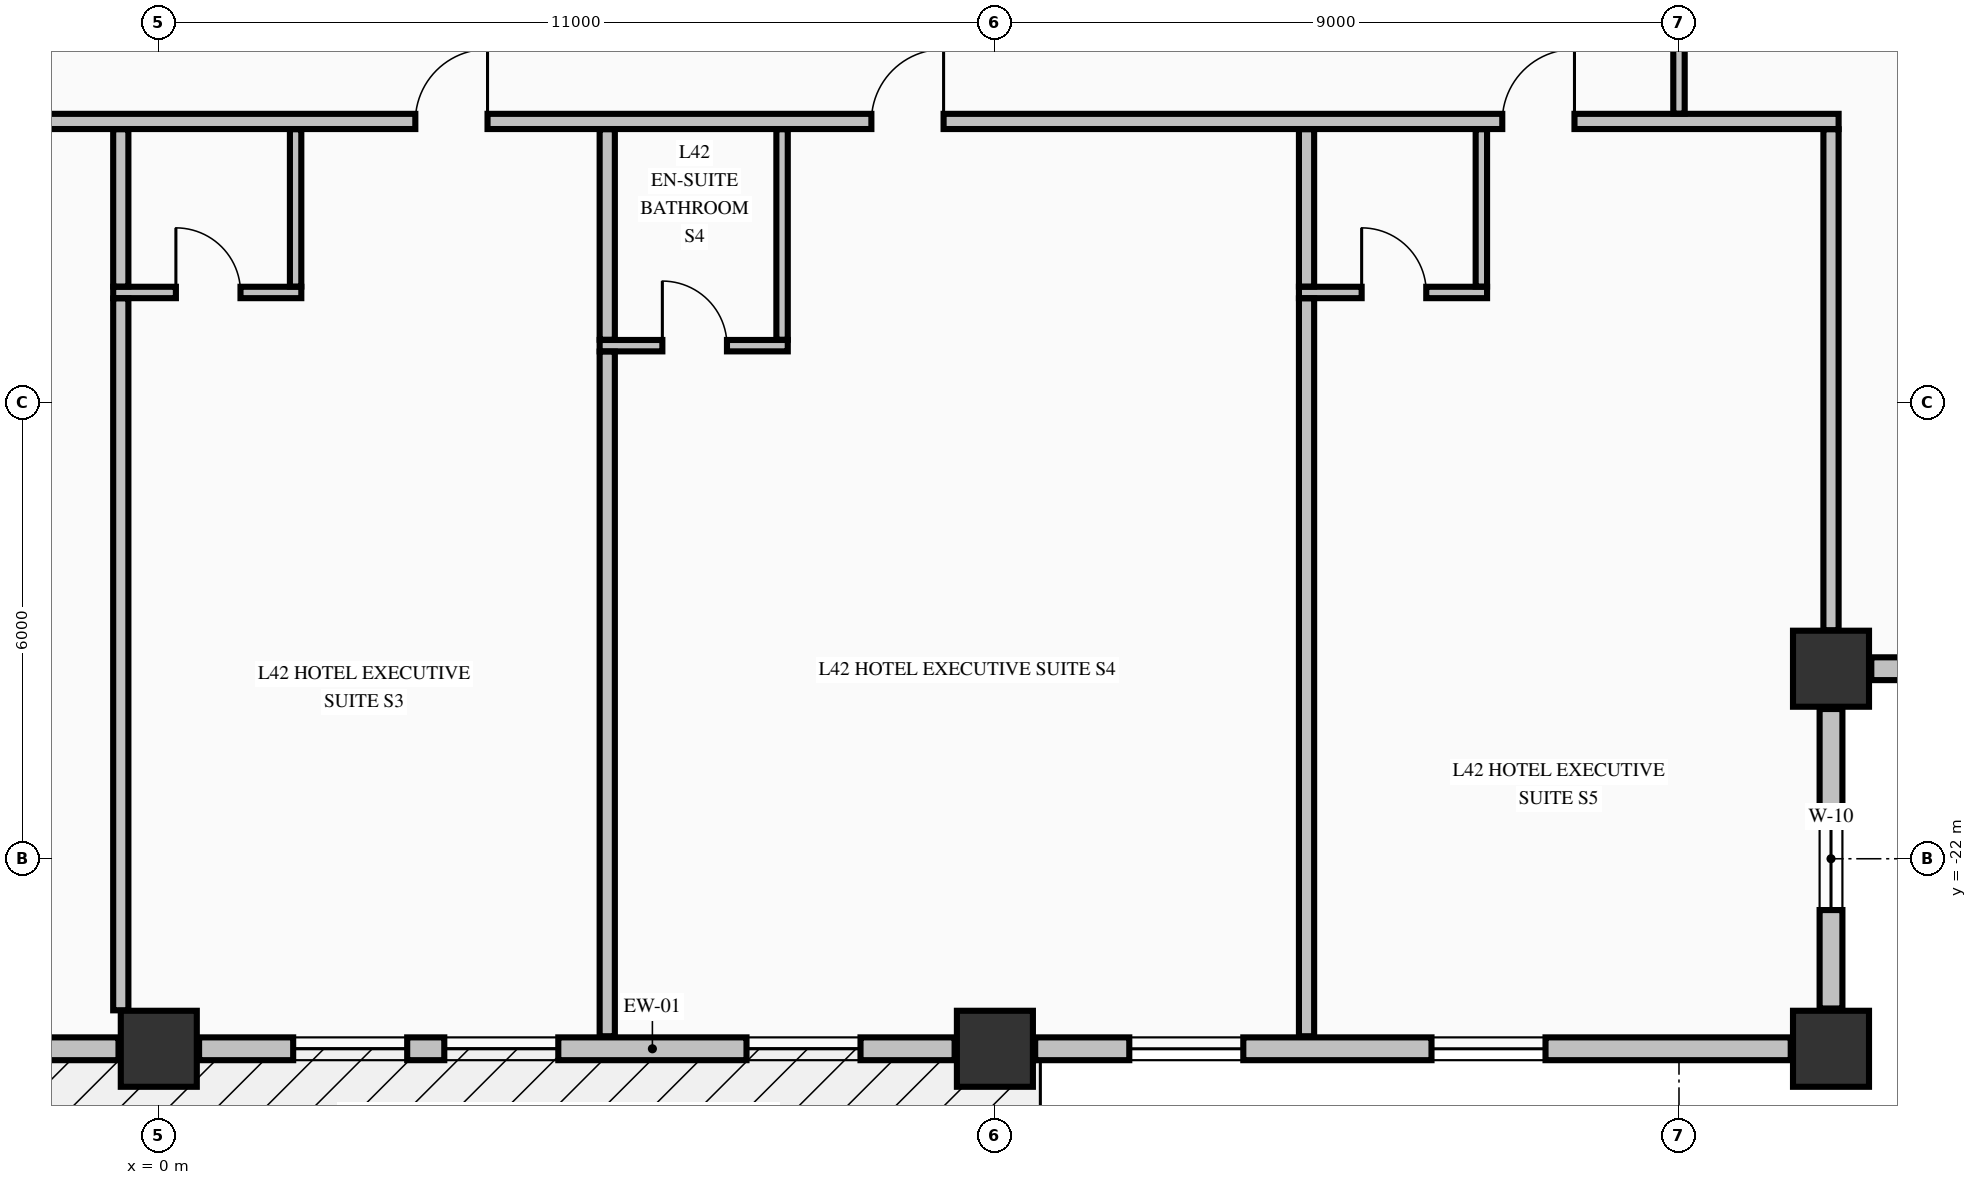
"""IFC4 building model, lengths in metres.
Left out: names, types, materials, properties, quantities, classifications, styles, units other than length and angle.
Written with IfcOpenShell. Run it as: python <this file> out.ifc"""

import sys

from ifc_helpers import new_model, si_unit, direction, frame, frame_2d, origin, origin_2d, place, context, subcontext, project, spatial, rectangle, extrude, element, fill, save


model = new_model("IFC4")
c1 = context("Model", 3, precision=1e-05, world=origin(), true_north=direction((0.0, 1.0)))
c2 = subcontext(c1, "Body", "Model", "MODEL_VIEW")
j1 = project(units=[si_unit("LENGTHUNIT", "METRE"), si_unit("PLANEANGLEUNIT", "RADIAN")], contexts=[c1])
p1 = place(None, origin())
s1 = spatial("IfcSite", under=j1, at=p1, CompositionType="ELEMENT")
p2 = place(p1, origin())
s2 = spatial("IfcBuilding", under=s1, at=p2, CompositionType="ELEMENT")
p3 = place(p2, frame((0.0, 0.0, 166.06)))
s3 = spatial("IfcBuildingStorey", under=s2, at=p3, CompositionType="ELEMENT", Elevation=166.06)
for number, where, z_axis, x_axis in (
    (1, (0.0, -24.5, -0.25), (0.0, 0.0, 1.0), (1.0, 0.0, 0.0)),
    (2, (11.0, -24.5, -0.25), (0.0, 0.0, 1.0), (1.0, 0.0, 0.0)),
    (3, (22.0, -24.5, -0.25), (0.0, 0.0, 1.0), (1.0, 0.0, 0.0)),
    (4, (22.0, -19.5, -0.25), (0.0, 0.0, 1.0), (1.0, 0.0, 0.0)),
):
    element("IfcColumn", number, at=place(p3, frame(where, z_axis=z_axis, x_axis=x_axis)), inside=s3, PredefinedType="COLUMN", context=c2, shape_type="SweptSolid", body=[
        extrude(rectangle(XDim=1.0, YDim=1.0, at=origin_2d()), origin(), (0.0, 0.0, 1.0), 3.4),
    ])
p4 = place(p3, frame((22.0, -23.97, 0.0), z_axis=(0.0, 0.0, 1.0), x_axis=(0.0, 1.0, 0.0)))
e5 = element("IfcWall", 5, at=p4, inside=s3, PredefinedType="STANDARD", context=c2, shape_type="SweptSolid", body=[
    extrude(rectangle(XDim=3.94, YDim=0.3, at=frame_2d((1.97, 0.0))), origin(), (0.0, 0.0, 1.0), 2.542),
])
p5 = place(p4, frame((1.295, 0.0, 0.68)))
e6 = element("IfcOpeningElement", 6, at=p5, cuts=e5, PredefinedType="OPENING", context=c2, shape_type="SweptSolid", body=[
    extrude(rectangle(XDim=1.35, YDim=1.42, at=frame_2d((0.675, 0.71))), frame((0.0, 0.16, 0.0), z_axis=(0.0, -1.0, 0.0), x_axis=(1.0, 0.0, 0.0)), (0.0, 0.0, 1.0), 0.32),
])
p6 = place(p3, frame((22.53, -19.5, 0.0), z_axis=(0.0, 0.0, 1.0), x_axis=(1.0, 0.0, 0.0)))
e7 = element("IfcWall", 7, at=p6, inside=s3, PredefinedType="STANDARD", context=c2, shape_type="SweptSolid", body=[
    extrude(rectangle(XDim=3.94, YDim=0.3, at=frame_2d((1.97, 0.0))), origin(), (0.0, 0.0, 1.0), 2.542),
])
p7 = place(p6, frame((1.295, 0.0, 0.68)))
e8 = element("IfcOpeningElement", 8, at=p7, cuts=e7, PredefinedType="OPENING", context=c2, shape_type="SweptSolid", body=[
    extrude(rectangle(XDim=1.35, YDim=1.42, at=frame_2d((0.675, 0.71))), frame((0.0, 0.16, 0.0), z_axis=(0.0, -1.0, 0.0), x_axis=(1.0, 0.0, 0.0)), (0.0, 0.0, 1.0), 0.32),
])
p8 = place(p3, frame((-10.47, -24.5, 0.0), z_axis=(0.0, 0.0, 1.0), x_axis=(1.0, 0.0, 0.0)))
e9 = element("IfcWall", 9, at=p8, inside=s3, PredefinedType="STANDARD", context=c2, shape_type="SweptSolid", body=[
    extrude(rectangle(XDim=9.94, YDim=0.3, at=frame_2d((4.97, 0.0))), origin(), (0.0, 0.0, 1.0), 2.542),
])
p9 = place(p8, frame((0.2, 0.0, 0.0)))
e10 = element("IfcOpeningElement", 10, at=p9, cuts=e9, PredefinedType="OPENING", context=c2, shape_type="SweptSolid", body=[
    extrude(rectangle(XDim=1.1, YDim=2.15, at=frame_2d((0.55, 1.075))), frame((0.0, 0.16, 0.0), z_axis=(0.0, -1.0, 0.0), x_axis=(1.0, 0.0, 0.0)), (0.0, 0.0, 1.0), 0.32),
])
p10 = place(p8, frame((5.214, 0.0, 0.72)))
e11 = element("IfcOpeningElement", 11, at=p10, cuts=e9, PredefinedType="OPENING", context=c2, shape_type="SweptSolid", body=[
    extrude(rectangle(XDim=1.5, YDim=1.6, at=frame_2d((0.75, 0.8))), frame((0.0, 0.16, 0.0), z_axis=(0.0, -1.0, 0.0), x_axis=(1.0, 0.0, 0.0)), (0.0, 0.0, 1.0), 0.32),
])
p11 = place(p8, frame((7.202, 0.0, 0.72)))
e12 = element("IfcOpeningElement", 12, at=p11, cuts=e9, PredefinedType="OPENING", context=c2, shape_type="SweptSolid", body=[
    extrude(rectangle(XDim=1.5, YDim=1.6, at=frame_2d((0.75, 0.8))), frame((0.0, 0.16, 0.0), z_axis=(0.0, -1.0, 0.0), x_axis=(1.0, 0.0, 0.0)), (0.0, 0.0, 1.0), 0.32),
])
p12 = place(p3, frame((0.53, -24.5, 0.0), z_axis=(0.0, 0.0, 1.0), x_axis=(1.0, 0.0, 0.0)))
e13 = element("IfcWall", 13, at=p12, inside=s3, PredefinedType="STANDARD", context=c2, shape_type="SweptSolid", body=[
    extrude(rectangle(XDim=9.94, YDim=0.3, at=frame_2d((4.97, 0.0))), origin(), (0.0, 0.0, 1.0), 2.542),
])
p13 = place(p12, frame((1.238, 0.0, 0.72)))
e14 = element("IfcOpeningElement", 14, at=p13, cuts=e13, PredefinedType="OPENING", context=c2, shape_type="SweptSolid", body=[
    extrude(rectangle(XDim=1.5, YDim=1.6, at=frame_2d((0.75, 0.8))), frame((0.0, 0.16, 0.0), z_axis=(0.0, -1.0, 0.0), x_axis=(1.0, 0.0, 0.0)), (0.0, 0.0, 1.0), 0.32),
])
p14 = place(p12, frame((3.226, 0.0, 0.72)))
e15 = element("IfcOpeningElement", 15, at=p14, cuts=e13, PredefinedType="OPENING", context=c2, shape_type="SweptSolid", body=[
    extrude(rectangle(XDim=1.5, YDim=1.6, at=frame_2d((0.75, 0.8))), frame((0.0, 0.16, 0.0), z_axis=(0.0, -1.0, 0.0), x_axis=(1.0, 0.0, 0.0)), (0.0, 0.0, 1.0), 0.32),
])
p15 = place(p12, frame((7.202, 0.0, 0.72)))
e16 = element("IfcOpeningElement", 16, at=p15, cuts=e13, PredefinedType="OPENING", context=c2, shape_type="SweptSolid", body=[
    extrude(rectangle(XDim=1.5, YDim=1.6, at=frame_2d((0.75, 0.8))), frame((0.0, 0.16, 0.0), z_axis=(0.0, -1.0, 0.0), x_axis=(1.0, 0.0, 0.0)), (0.0, 0.0, 1.0), 0.32),
])
p16 = place(p3, frame((11.53, -24.5, 0.0), z_axis=(0.0, 0.0, 1.0), x_axis=(1.0, 0.0, 0.0)))
e17 = element("IfcWall", 17, at=p16, inside=s3, PredefinedType="STANDARD", context=c2, shape_type="SweptSolid", body=[
    extrude(rectangle(XDim=9.94, YDim=0.3, at=frame_2d((4.97, 0.0))), origin(), (0.0, 0.0, 1.0), 2.542),
])
p17 = place(p16, frame((1.238, 0.0, 0.72)))
e18 = element("IfcOpeningElement", 18, at=p17, cuts=e17, PredefinedType="OPENING", context=c2, shape_type="SweptSolid", body=[
    extrude(rectangle(XDim=1.5, YDim=1.6, at=frame_2d((0.75, 0.8))), frame((0.0, 0.16, 0.0), z_axis=(0.0, -1.0, 0.0), x_axis=(1.0, 0.0, 0.0)), (0.0, 0.0, 1.0), 0.32),
])
p18 = place(p16, frame((5.214, 0.0, 0.72)))
e19 = element("IfcOpeningElement", 19, at=p18, cuts=e17, PredefinedType="OPENING", context=c2, shape_type="SweptSolid", body=[
    extrude(rectangle(XDim=1.5, YDim=1.6, at=frame_2d((0.75, 0.8))), frame((0.0, 0.16, 0.0), z_axis=(0.0, -1.0, 0.0), x_axis=(1.0, 0.0, 0.0)), (0.0, 0.0, 1.0), 0.32),
])
p19 = place(p3, frame((5.8, -15.25, 0.0), z_axis=(0.0, 0.0, 1.0), x_axis=(1.0, 0.0, 0.0)))
e20 = element("IfcWall", 20, at=p19, inside=s3, PredefinedType="PARTITIONING", context=c2, shape_type="SweptSolid", body=[
    extrude(rectangle(XDim=2.475, YDim=0.15, at=frame_2d((1.237, 0.0))), origin(), (0.0, 0.0, 1.0), 3.15),
])
p20 = place(p19, frame((0.825, 0.0, 0.0)))
e21 = element("IfcOpeningElement", 21, at=p20, cuts=e20, PredefinedType="OPENING", context=c2, shape_type="SweptSolid", body=[
    extrude(rectangle(XDim=0.85, YDim=2.1, at=frame_2d((0.425, 1.05))), frame((0.0, 0.085, 0.0), z_axis=(0.0, -1.0, 0.0), x_axis=(1.0, 0.0, 0.0)), (0.0, 0.0, 1.0), 0.17),
])
p21 = place(p3, frame((-0.6, -14.55, 0.0), z_axis=(0.0, 0.0, 1.0), x_axis=(1.0, 0.0, 0.0)))
e22 = element("IfcWall", 22, at=p21, inside=s3, PredefinedType="PARTITIONING", context=c2, shape_type="SweptSolid", body=[
    extrude(rectangle(XDim=2.475, YDim=0.15, at=frame_2d((1.238, 0.0))), origin(), (0.0, 0.0, 1.0), 3.15),
])
p22 = place(p21, frame((0.825, 0.0, 0.0)))
e23 = element("IfcOpeningElement", 23, at=p22, cuts=e22, PredefinedType="OPENING", context=c2, shape_type="SweptSolid", body=[
    extrude(rectangle(XDim=0.85, YDim=2.1, at=frame_2d((0.425, 1.05))), frame((0.0, 0.085, 0.0), z_axis=(0.0, -1.0, 0.0), x_axis=(1.0, 0.0, 0.0)), (0.0, 0.0, 1.0), 0.17),
])
p23 = place(p3, frame((15.0, -14.55, 0.0), z_axis=(0.0, 0.0, 1.0), x_axis=(1.0, 0.0, 0.0)))
e24 = element("IfcWall", 24, at=p23, inside=s3, PredefinedType="PARTITIONING", context=c2, shape_type="SweptSolid", body=[
    extrude(rectangle(XDim=2.475, YDim=0.15, at=frame_2d((1.238, 0.0))), origin(), (0.0, 0.0, 1.0), 3.15),
])
p24 = place(p23, frame((0.825, 0.0, 0.0)))
e25 = element("IfcOpeningElement", 25, at=p24, cuts=e24, PredefinedType="OPENING", context=c2, shape_type="SweptSolid", body=[
    extrude(rectangle(XDim=0.85, YDim=2.1, at=frame_2d((0.425, 1.05))), frame((0.0, 0.085, 0.0), z_axis=(0.0, -1.0, 0.0), x_axis=(1.0, 0.0, 0.0)), (0.0, 0.0, 1.0), 0.17),
])
p25 = place(p3, frame((-17.1, -12.3, 0.0), z_axis=(0.0, 0.0, 1.0), x_axis=(1.0, 0.0, 0.0)))
e26 = element("IfcWall", 26, at=p25, inside=s3, PredefinedType="PARTITIONING", context=c2, shape_type="SweptSolid", body=[
    extrude(rectangle(XDim=39.2, YDim=0.2, at=frame_2d((19.6, 0.0))), origin(), (0.0, 0.0, 1.0), 3.15),
])
p26 = place(p25, frame((3.575, 0.0, 0.0)))
e27 = element("IfcOpeningElement", 27, at=p26, cuts=e26, PredefinedType="OPENING", context=c2, shape_type="SweptSolid", body=[
    extrude(rectangle(XDim=0.95, YDim=2.15, at=frame_2d((0.475, 1.075))), frame((0.0, 0.11, 0.0), z_axis=(0.0, -1.0, 0.0), x_axis=(1.0, 0.0, 0.0)), (0.0, 0.0, 1.0), 0.22),
])
p27 = place(p25, frame((14.505, 0.0, 0.0)))
e28 = element("IfcOpeningElement", 28, at=p27, cuts=e26, PredefinedType="OPENING", context=c2, shape_type="SweptSolid", body=[
    extrude(rectangle(XDim=0.95, YDim=2.15, at=frame_2d((0.475, 1.075))), frame((0.0, 0.11, 0.0), z_axis=(0.0, -1.0, 0.0), x_axis=(1.0, 0.0, 0.0)), (0.0, 0.0, 1.0), 0.22),
])
p28 = place(p25, frame((20.475, 0.0, 0.0)))
e29 = element("IfcOpeningElement", 29, at=p28, cuts=e26, PredefinedType="OPENING", context=c2, shape_type="SweptSolid", body=[
    extrude(rectangle(XDim=0.95, YDim=2.15, at=frame_2d((0.475, 1.075))), frame((0.0, 0.11, 0.0), z_axis=(0.0, -1.0, 0.0), x_axis=(1.0, 0.0, 0.0)), (0.0, 0.0, 1.0), 0.22),
])
p29 = place(p25, frame((26.475, 0.0, 0.0)))
e30 = element("IfcOpeningElement", 30, at=p29, cuts=e26, PredefinedType="OPENING", context=c2, shape_type="SweptSolid", body=[
    extrude(rectangle(XDim=0.95, YDim=2.15, at=frame_2d((0.475, 1.075))), frame((0.0, 0.11, 0.0), z_axis=(0.0, -1.0, 0.0), x_axis=(1.0, 0.0, 0.0)), (0.0, 0.0, 1.0), 0.22),
])
p30 = place(p25, frame((34.775, 0.0, 0.0)))
e31 = element("IfcOpeningElement", 31, at=p30, cuts=e26, PredefinedType="OPENING", context=c2, shape_type="SweptSolid", body=[
    extrude(rectangle(XDim=0.95, YDim=2.15, at=frame_2d((0.475, 1.075))), frame((0.0, 0.11, 0.0), z_axis=(0.0, -1.0, 0.0), x_axis=(1.0, 0.0, 0.0)), (0.0, 0.0, 1.0), 0.22),
])
p31 = place(p3, frame((-0.5, -23.994, 0.0), z_axis=(0.0, 0.0, 1.0), x_axis=(0.0, 1.0, 0.0)))
e32 = element("IfcWall", 32, at=p31, inside=s3, PredefinedType="PARTITIONING", context=c2, shape_type="SweptSolid", body=[
    extrude(rectangle(XDim=9.366, YDim=0.2, at=frame_2d((4.683, 0.0))), origin(), (0.0, 0.0, 1.0), 3.15),
])
p32 = place(p3, frame((-0.5, -14.472, 0.0), z_axis=(0.0, 0.0, 1.0), x_axis=(0.0, 1.0, 0.0)))
e33 = element("IfcWall", 33, at=p32, inside=s3, PredefinedType="PARTITIONING", context=c2, shape_type="SweptSolid", body=[
    extrude(rectangle(XDim=2.069, YDim=0.2, at=frame_2d((1.034, 0.0))), origin(), (0.0, 0.0, 1.0), 3.15),
])
p33 = place(p3, frame((1.8, -14.472, 0.0), z_axis=(0.0, 0.0, 1.0), x_axis=(0.0, 1.0, 0.0)))
e34 = element("IfcWall", 34, at=p33, inside=s3, PredefinedType="PARTITIONING", context=c2, shape_type="SweptSolid", body=[
    extrude(rectangle(XDim=2.069, YDim=0.15, at=frame_2d((1.034, 0.0))), origin(), (0.0, 0.0, 1.0), 3.15),
])
p34 = place(p3, frame((5.9, -24.335, 0.0), z_axis=(0.0, 0.0, 1.0), x_axis=(0.0, 1.0, 0.0)))
e35 = element("IfcWall", 35, at=p34, inside=s3, PredefinedType="PARTITIONING", context=c2, shape_type="SweptSolid", body=[
    extrude(rectangle(XDim=9.007, YDim=0.2, at=frame_2d((4.503, 0.0))), origin(), (0.0, 0.0, 1.0), 3.15),
])
p35 = place(p3, frame((5.9, -15.172, 0.0), z_axis=(0.0, 0.0, 1.0), x_axis=(0.0, 1.0, 0.0)))
e36 = element("IfcWall", 36, at=p35, inside=s3, PredefinedType="PARTITIONING", context=c2, shape_type="SweptSolid", body=[
    extrude(rectangle(XDim=2.769, YDim=0.2, at=frame_2d((1.385, 0.0))), origin(), (0.0, 0.0, 1.0), 3.15),
])
p36 = place(p3, frame((8.2, -15.172, 0.0), z_axis=(0.0, 0.0, 1.0), x_axis=(0.0, 1.0, 0.0)))
e37 = element("IfcWall", 37, at=p36, inside=s3, PredefinedType="PARTITIONING", context=c2, shape_type="SweptSolid", body=[
    extrude(rectangle(XDim=2.769, YDim=0.15, at=frame_2d((1.385, 0.0))), origin(), (0.0, 0.0, 1.0), 3.15),
])
p37 = place(p3, frame((15.1, -24.335, 0.0), z_axis=(0.0, 0.0, 1.0), x_axis=(0.0, 1.0, 0.0)))
e38 = element("IfcWall", 38, at=p37, inside=s3, PredefinedType="PARTITIONING", context=c2, shape_type="SweptSolid", body=[
    extrude(rectangle(XDim=9.707, YDim=0.2, at=frame_2d((4.854, 0.0))), origin(), (0.0, 0.0, 1.0), 3.15),
])
p38 = place(p3, frame((15.1, -14.472, 0.0), z_axis=(0.0, 0.0, 1.0), x_axis=(0.0, 1.0, 0.0)))
e39 = element("IfcWall", 39, at=p38, inside=s3, PredefinedType="PARTITIONING", context=c2, shape_type="SweptSolid", body=[
    extrude(rectangle(XDim=2.069, YDim=0.2, at=frame_2d((1.034, 0.0))), origin(), (0.0, 0.0, 1.0), 3.15),
])
p39 = place(p3, frame((17.4, -14.472, 0.0), z_axis=(0.0, 0.0, 1.0), x_axis=(0.0, 1.0, 0.0)))
e40 = element("IfcWall", 40, at=p39, inside=s3, PredefinedType="PARTITIONING", context=c2, shape_type="SweptSolid", body=[
    extrude(rectangle(XDim=2.069, YDim=0.15, at=frame_2d((1.034, 0.0))), origin(), (0.0, 0.0, 1.0), 3.15),
])
p40 = place(p3, frame((20.0, -12.197, 0.0), z_axis=(0.0, 0.0, 1.0), x_axis=(0.0, 1.0, 0.0)))
e41 = element("IfcWall", 41, at=p40, inside=s3, PredefinedType="PARTITIONING", context=c2, shape_type="SweptSolid", body=[
    extrude(rectangle(XDim=1.816, YDim=0.15, at=frame_2d((0.908, 0.0))), origin(), (0.0, 0.0, 1.0), 2.342),
])
p41 = place(p3, frame((22.0, -18.994, 0.0), z_axis=(0.0, 0.0, 1.0), x_axis=(0.0, 1.0, 0.0)))
e42 = element("IfcWall", 42, at=p41, inside=s3, PredefinedType="PARTITIONING", context=c2, shape_type="SweptSolid", body=[
    extrude(rectangle(XDim=6.591, YDim=0.2, at=frame_2d((3.295, 0.0))), origin(), (0.0, 0.0, 1.0), 3.15),
])
p42 = place(p5, origin())
e43 = element("IfcWindow", 43, at=p42, inside=s3, PartitioningType="SINGLE_PANEL", PredefinedType="WINDOW", context=c2, shape_type="SweptSolid", body=[
    extrude(rectangle(XDim=1.35, YDim=1.42, at=frame_2d((0.675, 0.71))), frame((0.0, 0.03, 0.0), z_axis=(0.0, -1.0, 0.0), x_axis=(1.0, 0.0, 0.0)), (0.0, 0.0, 1.0), 0.06),
])
fill(e6, e43)
p43 = place(p13, origin())
e44 = element("IfcWindow", 44, at=p43, inside=s3, PartitioningType="SINGLE_PANEL", PredefinedType="WINDOW", context=c2, shape_type="SweptSolid", body=[
    extrude(rectangle(XDim=1.5, YDim=1.6, at=frame_2d((0.75, 0.8))), frame((0.0, 0.03, 0.0), z_axis=(0.0, -1.0, 0.0), x_axis=(1.0, 0.0, 0.0)), (0.0, 0.0, 1.0), 0.06),
])
fill(e14, e44)
p44 = place(p14, origin())
e45 = element("IfcWindow", 45, at=p44, inside=s3, PartitioningType="SINGLE_PANEL", PredefinedType="WINDOW", context=c2, shape_type="SweptSolid", body=[
    extrude(rectangle(XDim=1.5, YDim=1.6, at=frame_2d((0.75, 0.8))), frame((0.0, 0.03, 0.0), z_axis=(0.0, -1.0, 0.0), x_axis=(1.0, 0.0, 0.0)), (0.0, 0.0, 1.0), 0.06),
])
fill(e15, e45)
p45 = place(p15, origin())
e46 = element("IfcWindow", 46, at=p45, inside=s3, PartitioningType="SINGLE_PANEL", PredefinedType="WINDOW", context=c2, shape_type="SweptSolid", body=[
    extrude(rectangle(XDim=1.5, YDim=1.6, at=frame_2d((0.75, 0.8))), frame((0.0, 0.03, 0.0), z_axis=(0.0, -1.0, 0.0), x_axis=(1.0, 0.0, 0.0)), (0.0, 0.0, 1.0), 0.06),
])
fill(e16, e46)
p46 = place(p17, origin())
e47 = element("IfcWindow", 47, at=p46, inside=s3, PartitioningType="SINGLE_PANEL", PredefinedType="WINDOW", context=c2, shape_type="SweptSolid", body=[
    extrude(rectangle(XDim=1.5, YDim=1.6, at=frame_2d((0.75, 0.8))), frame((0.0, 0.03, 0.0), z_axis=(0.0, -1.0, 0.0), x_axis=(1.0, 0.0, 0.0)), (0.0, 0.0, 1.0), 0.06),
])
fill(e18, e47)
p47 = place(p18, origin())
e48 = element("IfcWindow", 48, at=p47, inside=s3, PartitioningType="SINGLE_PANEL", PredefinedType="WINDOW", context=c2, shape_type="SweptSolid", body=[
    extrude(rectangle(XDim=1.5, YDim=1.6, at=frame_2d((0.75, 0.8))), frame((0.0, 0.03, 0.0), z_axis=(0.0, -1.0, 0.0), x_axis=(1.0, 0.0, 0.0)), (0.0, 0.0, 1.0), 0.06),
])
fill(e19, e48)
p48 = place(p28, origin())
e49 = element("IfcDoor", 49, at=p48, inside=s3, OperationType="SINGLE_SWING_RIGHT", PredefinedType="DOOR", context=c2, shape_type="SweptSolid", body=[
    extrude(rectangle(XDim=0.95, YDim=2.15, at=frame_2d((0.475, 1.075))), frame((0.0, 0.025, 0.0), z_axis=(0.0, -1.0, 0.0), x_axis=(1.0, 0.0, 0.0)), (0.0, 0.0, 1.0), 0.05),
])
fill(e29, e49)
p49 = place(p22, origin())
e50 = element("IfcDoor", 50, at=p49, inside=s3, OperationType="SINGLE_SWING_LEFT", PredefinedType="DOOR", context=c2, shape_type="SweptSolid", body=[
    extrude(rectangle(XDim=0.85, YDim=2.1, at=frame_2d((0.425, 1.05))), frame((0.0, 0.025, 0.0), z_axis=(0.0, -1.0, 0.0), x_axis=(1.0, 0.0, 0.0)), (0.0, 0.0, 1.0), 0.05),
])
fill(e23, e50)
p50 = place(p29, origin())
e51 = element("IfcDoor", 51, at=p50, inside=s3, OperationType="SINGLE_SWING_RIGHT", PredefinedType="DOOR", context=c2, shape_type="SweptSolid", body=[
    extrude(rectangle(XDim=0.95, YDim=2.15, at=frame_2d((0.475, 1.075))), frame((0.0, 0.025, 0.0), z_axis=(0.0, -1.0, 0.0), x_axis=(1.0, 0.0, 0.0)), (0.0, 0.0, 1.0), 0.05),
])
fill(e30, e51)
p51 = place(p20, origin())
e52 = element("IfcDoor", 52, at=p51, inside=s3, OperationType="SINGLE_SWING_LEFT", PredefinedType="DOOR", context=c2, shape_type="SweptSolid", body=[
    extrude(rectangle(XDim=0.85, YDim=2.1, at=frame_2d((0.425, 1.05))), frame((0.0, 0.025, 0.0), z_axis=(0.0, -1.0, 0.0), x_axis=(1.0, 0.0, 0.0)), (0.0, 0.0, 1.0), 0.05),
])
fill(e21, e52)
p52 = place(p30, origin())
e53 = element("IfcDoor", 53, at=p52, inside=s3, OperationType="SINGLE_SWING_RIGHT", PredefinedType="DOOR", context=c2, shape_type="SweptSolid", body=[
    extrude(rectangle(XDim=0.95, YDim=2.15, at=frame_2d((0.475, 1.075))), frame((0.0, 0.025, 0.0), z_axis=(0.0, -1.0, 0.0), x_axis=(1.0, 0.0, 0.0)), (0.0, 0.0, 1.0), 0.05),
])
fill(e31, e53)
p53 = place(p24, origin())
e54 = element("IfcDoor", 54, at=p53, inside=s3, OperationType="SINGLE_SWING_LEFT", PredefinedType="DOOR", context=c2, shape_type="SweptSolid", body=[
    extrude(rectangle(XDim=0.85, YDim=2.1, at=frame_2d((0.425, 1.05))), frame((0.0, 0.025, 0.0), z_axis=(0.0, -1.0, 0.0), x_axis=(1.0, 0.0, 0.0)), (0.0, 0.0, 1.0), 0.05),
])
fill(e25, e54)
save(model, sys.argv[1])
